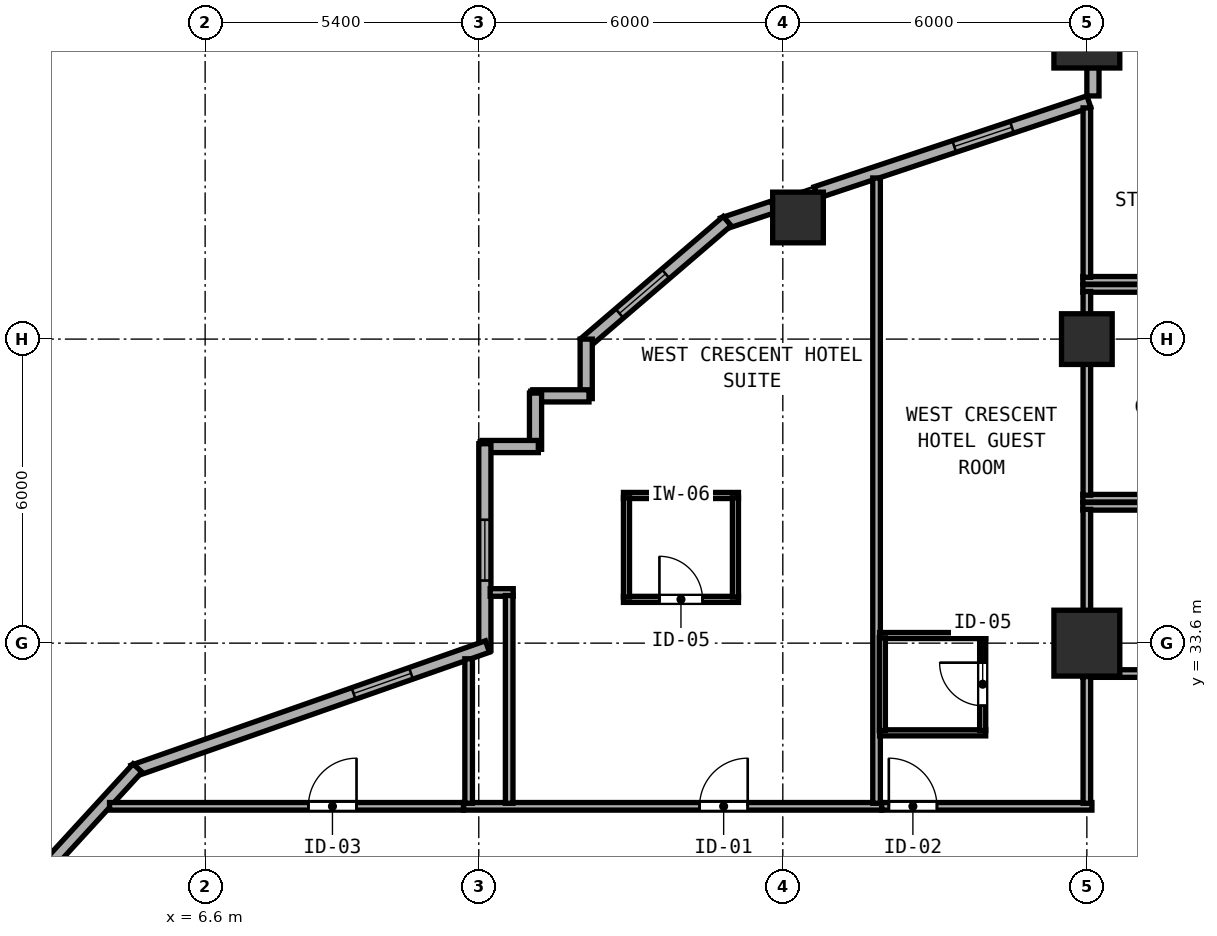
"""IFC4 building model, lengths in metres.
Left out: names, types, materials, properties, quantities, classifications, styles, units other than length and angle.
Written with IfcOpenShell. Run it as: python <this file> out.ifc"""

import sys

from ifc_helpers import new_model, si_unit, direction, frame, frame_2d, origin, origin_2d, place, context, subcontext, project, spatial, rectangle, hollow_rectangle, extrude, element, fill, save


model = new_model("IFC4")
c1 = context("Model", 3, precision=1e-05, world=origin(), true_north=direction((0.0, 1.0)))
c2 = subcontext(c1, "Body", "Model", "MODEL_VIEW")
j1 = project(units=[si_unit("LENGTHUNIT", "METRE"), si_unit("PLANEANGLEUNIT", "RADIAN")], contexts=[c1])
p1 = place(None, origin())
s1 = spatial("IfcSite", under=j1, at=p1, CompositionType="ELEMENT")
p2 = place(p1, origin())
s2 = spatial("IfcBuilding", under=s1, at=p2, CompositionType="ELEMENT")
p3 = place(p2, frame((0.0, 0.0, 31.6)))
s3 = spatial("IfcBuildingStorey", under=s2, at=p3, CompositionType="ELEMENT", Elevation=31.6)
for number, where, z_axis, x_axis in (
    (1, (24.0, 33.6, 0.0), (0.0, 0.0, 1.0), (1.0, 0.0, 0.0)),
    (2, (24.0, 45.6, 0.0), (0.0, 0.0, 1.0), (1.0, 0.0, 0.0)),
):
    element("IfcColumn", number, at=place(p3, frame(where, z_axis=z_axis, x_axis=x_axis)), inside=s3, PredefinedType="COLUMN", context=c2, shape_type="SweptSolid", body=[
        extrude(hollow_rectangle(XDim=1.3, YDim=1.3, WallThickness=0.048, at=origin_2d()), origin(), (0.0, 0.0, 1.0), 3.8),
    ])
for number, where, z_axis, x_axis in (
    (3, (24.0, 39.6, 0.0), (0.0, 0.0, 1.0), (1.0, 0.0, 0.0)),
    (4, (18.3, 42.0, 0.0), (0.0, 0.0, 1.0), (1.0, 0.0, 0.0)),
):
    element("IfcColumn", number, at=place(p3, frame(where, z_axis=z_axis, x_axis=x_axis)), inside=s3, PredefinedType="COLUMN", context=c2, shape_type="SweptSolid", body=[
        extrude(hollow_rectangle(XDim=1.0, YDim=1.0, WallThickness=0.038, at=origin_2d()), origin(), (0.0, 0.0, 1.0), 3.8),
    ])
p4 = place(p3, frame((24.12, 44.958, 0.0), z_axis=(0.0, 0.0, 1.0), x_axis=(0.0, -1.0, 0.0)))
e5 = element("IfcWall", 5, at=p4, inside=s3, PredefinedType="SOLIDWALL", context=c2, shape_type="SweptSolid", body=[
    extrude(rectangle(XDim=0.56, YDim=0.24, at=frame_2d((0.28, 0.0))), origin(), (0.0, 0.0, 1.0), 3.097),
])
p5 = place(p3, frame((24.039, 44.287, 0.0), z_axis=(0.0, 0.0, 1.0), x_axis=(-0.948678995954, -0.316240672014, 0.0)))
e6 = element("IfcWall", 6, at=p5, inside=s3, PredefinedType="SOLIDWALL", context=c2, shape_type="SweptSolid", body=[
    extrude(rectangle(XDim=5.675, YDim=0.24, at=frame_2d((2.837, 0.0))), origin(), (0.0, 0.0, 1.0), 3.097),
])
p6 = place(p5, frame((1.6, 0.0, 0.85)))
e7 = element("IfcOpeningElement", 7, at=p6, cuts=e6, PredefinedType="OPENING", context=c2, shape_type="SweptSolid", body=[
    extrude(rectangle(XDim=1.2, YDim=1.85, at=frame_2d((0.6, 0.925))), frame((0.0, 0.13, 0.0), z_axis=(0.0, -1.0, 0.0), x_axis=(1.0, 0.0, 0.0)), (0.0, 0.0, 1.0), 0.26),
])
p7 = place(p3, frame((17.808, 42.209, 0.0), z_axis=(0.0, 0.0, 1.0), x_axis=(-0.948706457285, -0.316158279832, 0.0)))
e8 = element("IfcWall", 8, at=p7, inside=s3, PredefinedType="SOLIDWALL", context=c2, shape_type="SweptSolid", body=[
    extrude(rectangle(XDim=1.054, YDim=0.24, at=frame_2d((0.527, 0.0))), origin(), (0.0, 0.0, 1.0), 3.6),
])
p8 = place(p3, frame((16.902, 41.929, 0.0), z_axis=(0.0, 0.0, 1.0), x_axis=(-0.759275136126, -0.650769750112, 0.0)))
e9 = element("IfcWall", 9, at=p8, inside=s3, PredefinedType="SOLIDWALL", context=c2, shape_type="SweptSolid", body=[
    extrude(rectangle(XDim=3.719, YDim=0.24, at=frame_2d((1.86, 0.0))), origin(), (0.0, 0.0, 1.0), 3.6),
])
p9 = place(p8, frame((1.6, 0.0, 0.85)))
e10 = element("IfcOpeningElement", 10, at=p9, cuts=e9, PredefinedType="OPENING", context=c2, shape_type="SweptSolid", body=[
    extrude(rectangle(XDim=1.2, YDim=1.85, at=frame_2d((0.6, 0.925))), frame((0.0, 0.13, 0.0), z_axis=(0.0, -1.0, 0.0), x_axis=(1.0, 0.0, 0.0)), (0.0, 0.0, 1.0), 0.26),
])
p10 = place(p3, frame((14.12, 39.6, 0.0), z_axis=(0.0, 0.0, 1.0), x_axis=(0.0, -1.0, 0.0)))
e11 = element("IfcWall", 11, at=p10, inside=s3, PredefinedType="SOLIDWALL", context=c2, shape_type="SweptSolid", body=[
    extrude(rectangle(XDim=1.175, YDim=0.24, at=frame_2d((0.587, 0.0))), origin(), (0.0, 0.0, 1.0), 3.6),
])
p11 = place(p3, frame((14.175, 38.48, 0.0), z_axis=(0.0, 0.0, 1.0), x_axis=(-1.0, 0.0, 0.0)))
e12 = element("IfcWall", 12, at=p11, inside=s3, PredefinedType="SOLIDWALL", context=c2, shape_type="SweptSolid", body=[
    extrude(rectangle(XDim=1.11, YDim=0.24, at=frame_2d((0.555, 0.0))), origin(), (0.0, 0.0, 1.0), 3.6),
])
p12 = place(p3, frame((13.12, 38.535, 0.0), z_axis=(0.0, 0.0, 1.0), x_axis=(0.0, -1.0, 0.0)))
e13 = element("IfcWall", 13, at=p12, inside=s3, PredefinedType="SOLIDWALL", context=c2, shape_type="SweptSolid", body=[
    extrude(rectangle(XDim=1.11, YDim=0.24, at=frame_2d((0.555, 0.0))), origin(), (0.0, 0.0, 1.0), 3.6),
])
p13 = place(p3, frame((13.175, 37.48, 0.0), z_axis=(0.0, 0.0, 1.0), x_axis=(-1.0, 0.0, 0.0)))
e14 = element("IfcWall", 14, at=p13, inside=s3, PredefinedType="SOLIDWALL", context=c2, shape_type="SweptSolid", body=[
    extrude(rectangle(XDim=1.11, YDim=0.24, at=frame_2d((0.555, 0.0))), origin(), (0.0, 0.0, 1.0), 3.6),
])
p14 = place(p3, frame((12.12, 37.535, 0.0), z_axis=(0.0, 0.0, 1.0), x_axis=(0.0, -1.0, 0.0)))
e15 = element("IfcWall", 15, at=p14, inside=s3, PredefinedType="SOLIDWALL", context=c2, shape_type="SweptSolid", body=[
    extrude(rectangle(XDim=4.075, YDim=0.24, at=frame_2d((2.038, 0.0))), origin(), (0.0, 0.0, 1.0), 3.6),
])
p15 = place(p14, frame((1.5, 0.0, 0.85)))
e16 = element("IfcOpeningElement", 16, at=p15, cuts=e15, PredefinedType="OPENING", context=c2, shape_type="SweptSolid", body=[
    extrude(rectangle(XDim=1.2, YDim=1.85, at=frame_2d((0.6, 0.925))), frame((0.0, 0.13, 0.0), z_axis=(0.0, -1.0, 0.0), x_axis=(1.0, 0.0, 0.0)), (0.0, 0.0, 1.0), 0.26),
])
p16 = place(p3, frame((12.172, 33.533, 0.0), z_axis=(0.0, 0.0, 1.0), x_axis=(-0.943600343117, -0.331086684222, 0.0)))
e17 = element("IfcWall", 17, at=p16, inside=s3, PredefinedType="SOLIDWALL", context=c2, shape_type="SweptSolid", body=[
    extrude(rectangle(XDim=7.414, YDim=0.24, at=frame_2d((3.707, 0.0))), origin(), (0.0, 0.0, 1.0), 3.6),
])
p17 = place(p16, frame((1.6, 0.0, 0.85)))
e18 = element("IfcOpeningElement", 18, at=p17, cuts=e17, PredefinedType="OPENING", context=c2, shape_type="SweptSolid", body=[
    extrude(rectangle(XDim=1.2, YDim=1.85, at=frame_2d((0.6, 0.925))), frame((0.0, 0.13, 0.0), z_axis=(0.0, -1.0, 0.0), x_axis=(1.0, 0.0, 0.0)), (0.0, 0.0, 1.0), 0.26),
])
p18 = place(p3, frame((5.265, 31.137, 0.0), z_axis=(0.0, 0.0, 1.0), x_axis=(-0.675785130265, -0.737098675696, 0.0)))
e19 = element("IfcWall", 19, at=p18, inside=s3, PredefinedType="SOLIDWALL", context=c2, shape_type="SweptSolid", body=[
    extrude(rectangle(XDim=3.289, YDim=0.24, at=frame_2d((1.645, 0.0))), origin(), (0.0, 0.0, 1.0), 3.6),
])
for number, where, z_axis, x_axis in (
    (20, (23.92, 36.3, 0.0), (0.0, 0.0, 1.0), (1.0, 0.0, 0.0)),
    (21, (23.92, 33.0, 0.0), (0.0, 0.0, 1.0), (1.0, 0.0, 0.0)),
):
    element("IfcWall", number, at=place(p3, frame(where, z_axis=z_axis, x_axis=x_axis)), inside=s3, PredefinedType="PARTITIONING", context=c2, shape_type="SweptSolid", body=[
        extrude(rectangle(XDim=3.8, YDim=0.15, at=frame_2d((1.9, 0.0))), origin(), (0.0, 0.0, 1.0), 3.6),
    ])
p19 = place(p3, frame((24.0, 33.06, 0.0), z_axis=(0.0, 0.0, 1.0), x_axis=(0.0, 1.0, 0.0)))
e22 = element("IfcWall", 22, at=p19, inside=s3, PredefinedType="PARTITIONING", context=c2, shape_type="SweptSolid", body=[
    extrude(rectangle(XDim=3.18, YDim=0.15, at=frame_2d((1.59, 0.0))), origin(), (0.0, 0.0, 1.0), 3.097),
])
for number, where, z_axis, x_axis in (
    (23, (23.92, 40.6, 0.0), (0.0, 0.0, 1.0), (1.0, 0.0, 0.0)),
    (24, (23.92, 36.46, 0.0), (0.0, 0.0, 1.0), (1.0, 0.0, 0.0)),
):
    element("IfcWall", number, at=place(p3, frame(where, z_axis=z_axis, x_axis=x_axis)), inside=s3, PredefinedType="PARTITIONING", context=c2, shape_type="SweptSolid", body=[
        extrude(rectangle(XDim=3.8, YDim=0.15, at=frame_2d((1.9, 0.0))), origin(), (0.0, 0.0, 1.0), 3.6),
    ])
p20 = place(p3, frame((24.0, 36.52, 0.0), z_axis=(0.0, 0.0, 1.0), x_axis=(0.0, 1.0, 0.0)))
e25 = element("IfcWall", 25, at=p20, inside=s3, PredefinedType="PARTITIONING", context=c2, shape_type="SweptSolid", body=[
    extrude(rectangle(XDim=4.02, YDim=0.15, at=frame_2d((2.01, 0.0))), origin(), (0.0, 0.0, 1.0), 3.097),
])
p21 = place(p3, frame((23.92, 40.76, 0.0), z_axis=(0.0, 0.0, 1.0), x_axis=(1.0, 0.0, 0.0)))
e26 = element("IfcWall", 26, at=p21, inside=s3, PredefinedType="PARTITIONING", context=c2, shape_type="SweptSolid", body=[
    extrude(rectangle(XDim=3.8, YDim=0.15, at=frame_2d((1.9, 0.0))), origin(), (0.0, 0.0, 1.0), 3.6),
])
p22 = place(p3, frame((24.0, 40.82, 0.0), z_axis=(0.0, 0.0, 1.0), x_axis=(0.0, 1.0, 0.0)))
e27 = element("IfcWall", 27, at=p22, inside=s3, PredefinedType="PARTITIONING", context=c2, shape_type="SweptSolid", body=[
    extrude(rectangle(XDim=3.343, YDim=0.15, at=frame_2d((1.671, 0.0))), origin(), (0.0, 0.0, 1.0), 3.097),
])
p23 = place(p3, frame((11.7, 30.38, 0.0), z_axis=(0.0, 0.0, 1.0), x_axis=(1.0, 0.0, 0.0)))
e28 = element("IfcWall", 28, at=p23, inside=s3, PredefinedType="PARTITIONING", context=c2, shape_type="SweptSolid", body=[
    extrude(rectangle(XDim=8.25, YDim=0.15, at=frame_2d((4.125, 0.0))), origin(), (0.0, 0.0, 1.0), 3.6),
])
p24 = place(p23, frame((4.657, 0.0, 0.0)))
e29 = element("IfcOpeningElement", 29, at=p24, cuts=e28, PredefinedType="OPENING", context=c2, shape_type="SweptSolid", body=[
    extrude(rectangle(XDim=0.95, YDim=2.18, at=frame_2d((0.475, 1.09))), frame((0.0, 0.085, 0.0), z_axis=(0.0, -1.0, 0.0), x_axis=(1.0, 0.0, 0.0)), (0.0, 0.0, 1.0), 0.17),
])
p25 = place(p3, frame((11.8, 30.44, 0.0), z_axis=(0.0, 0.0, 1.0), x_axis=(0.0, 1.0, 0.0)))
e30 = element("IfcWall", 30, at=p25, inside=s3, PredefinedType="PARTITIONING", context=c2, shape_type="SweptSolid", body=[
    extrude(rectangle(XDim=2.851, YDim=0.15, at=frame_2d((1.426, 0.0))), origin(), (0.0, 0.0, 1.0), 3.6),
])
p26 = place(p3, frame((19.85, 30.44, 0.0), z_axis=(0.0, 0.0, 1.0), x_axis=(0.0, 1.0, 0.0)))
e31 = element("IfcWall", 31, at=p26, inside=s3, PredefinedType="PARTITIONING", context=c2, shape_type="SweptSolid", body=[
    extrude(rectangle(XDim=12.34, YDim=0.15, at=frame_2d((6.17, 0.0))), origin(), (0.0, 0.0, 1.0), 3.6),
])
p27 = place(p3, frame((14.855, 36.514, 0.0), z_axis=(0.0, 0.0, 1.0), x_axis=(1.0, 0.0, 0.0)))
e32 = element("IfcWall", 32, at=p27, inside=s3, PredefinedType="PARTITIONING", context=c2, shape_type="SweptSolid", body=[
    extrude(rectangle(XDim=2.27, YDim=0.12, at=frame_2d((1.135, 0.0))), origin(), (0.0, 0.0, 1.0), 3.6),
])
p28 = place(p3, frame((14.855, 34.464, 0.0), z_axis=(0.0, 0.0, 1.0), x_axis=(1.0, 0.0, 0.0)))
e33 = element("IfcWall", 33, at=p28, inside=s3, PredefinedType="PARTITIONING", context=c2, shape_type="SweptSolid", body=[
    extrude(rectangle(XDim=2.27, YDim=0.12, at=frame_2d((1.135, 0.0))), origin(), (0.0, 0.0, 1.0), 3.6),
])
p29 = place(p28, frame((0.71, 0.0, 0.0)))
e34 = element("IfcOpeningElement", 34, at=p29, cuts=e33, PredefinedType="OPENING", context=c2, shape_type="SweptSolid", body=[
    extrude(rectangle(XDim=0.85, YDim=2.1, at=frame_2d((0.425, 1.05))), frame((0.0, 0.07, 0.0), z_axis=(0.0, -1.0, 0.0), x_axis=(1.0, 0.0, 0.0)), (0.0, 0.0, 1.0), 0.14),
])
for number, where, z_axis, x_axis in (
    (35, (14.915, 34.509, 0.0), (0.0, 0.0, 1.0), (0.0, 1.0, 0.0)),
    (36, (17.065, 34.509, 0.0), (0.0, 0.0, 1.0), (0.0, 1.0, 0.0)),
):
    element("IfcWall", number, at=place(p3, frame(where, z_axis=z_axis, x_axis=x_axis)), inside=s3, PredefinedType="PARTITIONING", context=c2, shape_type="SweptSolid", body=[
        extrude(rectangle(XDim=1.96, YDim=0.12, at=frame_2d((0.98, 0.0))), origin(), (0.0, 0.0, 1.0), 3.6),
    ])
p30 = place(p3, frame((19.952, 30.38, 0.0), z_axis=(0.0, 0.0, 1.0), x_axis=(1.0, 0.0, 0.0)))
e37 = element("IfcWall", 37, at=p30, inside=s3, PredefinedType="PARTITIONING", context=c2, shape_type="SweptSolid", body=[
    extrude(rectangle(XDim=4.148, YDim=0.15, at=frame_2d((2.074, 0.0))), origin(), (0.0, 0.0, 1.0), 3.6),
])
p31 = place(p30, frame((0.14, 0.0, 0.0)))
e38 = element("IfcOpeningElement", 38, at=p31, cuts=e37, PredefinedType="OPENING", context=c2, shape_type="SweptSolid", body=[
    extrude(rectangle(XDim=0.95, YDim=2.15, at=frame_2d((0.475, 1.075))), frame((0.0, 0.085, 0.0), z_axis=(0.0, -1.0, 0.0), x_axis=(1.0, 0.0, 0.0)), (0.0, 0.0, 1.0), 0.17),
])
p32 = place(p3, frame((24.0, 30.44, 0.0), z_axis=(0.0, 0.0, 1.0), x_axis=(0.0, 1.0, 0.0)))
e39 = element("IfcWall", 39, at=p32, inside=s3, PredefinedType="PARTITIONING", context=c2, shape_type="SweptSolid", body=[
    extrude(rectangle(XDim=2.5, YDim=0.15, at=frame_2d((1.25, 0.0))), origin(), (0.0, 0.0, 1.0), 3.097),
])
for number, where, z_axis, x_axis in (
    (40, (19.91, 33.75, 0.0), (0.0, 0.0, 1.0), (1.0, 0.0, 0.0)),
    (41, (19.91, 31.83, 0.0), (0.0, 0.0, 1.0), (1.0, 0.0, 0.0)),
):
    element("IfcWall", number, at=place(p3, frame(where, z_axis=z_axis, x_axis=x_axis)), inside=s3, PredefinedType="PARTITIONING", context=c2, shape_type="SweptSolid", body=[
        extrude(rectangle(XDim=2.094, YDim=0.12, at=frame_2d((1.047, 0.0))), origin(), (0.0, 0.0, 1.0), 3.6),
    ])
p33 = place(p3, frame((19.964, 31.875, 0.0), z_axis=(0.0, 0.0, 1.0), x_axis=(0.0, 1.0, 0.0)))
e42 = element("IfcWall", 42, at=p33, inside=s3, PredefinedType="PARTITIONING", context=c2, shape_type="SweptSolid", body=[
    extrude(rectangle(XDim=1.83, YDim=0.12, at=frame_2d((0.915, 0.0))), origin(), (0.0, 0.0, 1.0), 3.6),
])
p34 = place(p3, frame((21.944, 31.875, 0.0), z_axis=(0.0, 0.0, 1.0), x_axis=(0.0, 1.0, 0.0)))
e43 = element("IfcWall", 43, at=p34, inside=s3, PredefinedType="PARTITIONING", context=c2, shape_type="SweptSolid", body=[
    extrude(rectangle(XDim=1.83, YDim=0.12, at=frame_2d((0.915, 0.0))), origin(), (0.0, 0.0, 1.0), 3.6),
])
p35 = place(p34, frame((0.49, 0.0, 0.0)))
e44 = element("IfcOpeningElement", 44, at=p35, cuts=e43, PredefinedType="OPENING", context=c2, shape_type="SweptSolid", body=[
    extrude(rectangle(XDim=0.85, YDim=2.1, at=frame_2d((0.425, 1.05))), frame((0.0, 0.07, 0.0), z_axis=(0.0, -1.0, 0.0), x_axis=(1.0, 0.0, 0.0)), (0.0, 0.0, 1.0), 0.14),
])
p36 = place(p3, frame((12.225, 34.6, 0.0), z_axis=(0.0, 0.0, 1.0), x_axis=(1.0, 0.0, 0.0)))
e45 = element("IfcWall", 45, at=p36, inside=s3, PredefinedType="PARTITIONING", context=c2, shape_type="SweptSolid", body=[
    extrude(rectangle(XDim=0.455, YDim=0.15, at=frame_2d((0.228, 0.0))), origin(), (0.0, 0.0, 1.0), 3.6),
])
p37 = place(p3, frame((4.714, 30.38, 0.0), z_axis=(0.0, 0.0, 1.0), x_axis=(1.0, 0.0, 0.0)))
e46 = element("IfcWall", 46, at=p37, inside=s3, PredefinedType="PARTITIONING", context=c2, shape_type="SweptSolid", body=[
    extrude(rectangle(XDim=6.984, YDim=0.15, at=frame_2d((3.492, 0.0))), origin(), (0.0, 0.0, 1.0), 3.6),
])
p38 = place(p37, frame((3.924, 0.0, 0.0)))
e47 = element("IfcOpeningElement", 47, at=p38, cuts=e46, PredefinedType="OPENING", context=c2, shape_type="SweptSolid", body=[
    extrude(rectangle(XDim=0.95, YDim=2.12, at=frame_2d((0.475, 1.06))), frame((0.0, 0.085, 0.0), z_axis=(0.0, -1.0, 0.0), x_axis=(1.0, 0.0, 0.0)), (0.0, 0.0, 1.0), 0.17),
])
p39 = place(p3, frame((12.6, 30.44, 0.0), z_axis=(0.0, 0.0, 1.0), x_axis=(0.0, 1.0, 0.0)))
e48 = element("IfcWall", 48, at=p39, inside=s3, PredefinedType="PARTITIONING", context=c2, shape_type="SweptSolid", body=[
    extrude(rectangle(XDim=4.1, YDim=0.15, at=frame_2d((2.05, 0.0))), origin(), (0.0, 0.0, 1.0), 3.6),
])
p40 = place(p6, origin())
e49 = element("IfcWindow", 49, at=p40, inside=s3, PartitioningType="SINGLE_PANEL", PredefinedType="WINDOW", context=c2, shape_type="SweptSolid", body=[
    extrude(rectangle(XDim=1.2, YDim=1.85, at=frame_2d((0.6, 0.925))), frame((0.0, 0.03, 0.0), z_axis=(0.0, -1.0, 0.0), x_axis=(1.0, 0.0, 0.0)), (0.0, 0.0, 1.0), 0.06),
])
fill(e7, e49)
p41 = place(p9, origin())
e50 = element("IfcWindow", 50, at=p41, inside=s3, PartitioningType="SINGLE_PANEL", PredefinedType="WINDOW", context=c2, shape_type="SweptSolid", body=[
    extrude(rectangle(XDim=1.2, YDim=1.85, at=frame_2d((0.6, 0.925))), frame((0.0, 0.03, 0.0), z_axis=(0.0, -1.0, 0.0), x_axis=(1.0, 0.0, 0.0)), (0.0, 0.0, 1.0), 0.06),
])
fill(e10, e50)
p42 = place(p15, origin())
e51 = element("IfcWindow", 51, at=p42, inside=s3, PartitioningType="SINGLE_PANEL", PredefinedType="WINDOW", context=c2, shape_type="SweptSolid", body=[
    extrude(rectangle(XDim=1.2, YDim=1.85, at=frame_2d((0.6, 0.925))), frame((0.0, 0.03, 0.0), z_axis=(0.0, -1.0, 0.0), x_axis=(1.0, 0.0, 0.0)), (0.0, 0.0, 1.0), 0.06),
])
fill(e16, e51)
p43 = place(p17, origin())
e52 = element("IfcWindow", 52, at=p43, inside=s3, PartitioningType="SINGLE_PANEL", PredefinedType="WINDOW", context=c2, shape_type="SweptSolid", body=[
    extrude(rectangle(XDim=1.2, YDim=1.85, at=frame_2d((0.6, 0.925))), frame((0.0, 0.03, 0.0), z_axis=(0.0, -1.0, 0.0), x_axis=(1.0, 0.0, 0.0)), (0.0, 0.0, 1.0), 0.06),
])
fill(e18, e52)
p44 = place(p24, origin())
e53 = element("IfcDoor", 53, at=p44, inside=s3, OperationType="SINGLE_SWING_RIGHT", PredefinedType="DOOR", context=c2, shape_type="SweptSolid", body=[
    extrude(rectangle(XDim=0.95, YDim=2.18, at=frame_2d((0.475, 1.09))), frame((0.0, 0.025, 0.0), z_axis=(0.0, -1.0, 0.0), x_axis=(1.0, 0.0, 0.0)), (0.0, 0.0, 1.0), 0.05),
])
fill(e29, e53)
p45 = place(p29, origin())
e54 = element("IfcDoor", 54, at=p45, inside=s3, OperationType="SINGLE_SWING_LEFT", PredefinedType="DOOR", context=c2, shape_type="SweptSolid", body=[
    extrude(rectangle(XDim=0.85, YDim=2.1, at=frame_2d((0.425, 1.05))), frame((0.0, 0.025, 0.0), z_axis=(0.0, -1.0, 0.0), x_axis=(1.0, 0.0, 0.0)), (0.0, 0.0, 1.0), 0.05),
])
fill(e34, e54)
p46 = place(p31, origin())
e55 = element("IfcDoor", 55, at=p46, inside=s3, OperationType="SINGLE_SWING_LEFT", PredefinedType="DOOR", context=c2, shape_type="SweptSolid", body=[
    extrude(rectangle(XDim=0.95, YDim=2.15, at=frame_2d((0.475, 1.075))), frame((0.0, 0.025, 0.0), z_axis=(0.0, -1.0, 0.0), x_axis=(1.0, 0.0, 0.0)), (0.0, 0.0, 1.0), 0.05),
])
fill(e38, e55)
p47 = place(p35, origin())
e56 = element("IfcDoor", 56, at=p47, inside=s3, OperationType="SINGLE_SWING_RIGHT", PredefinedType="DOOR", context=c2, shape_type="SweptSolid", body=[
    extrude(rectangle(XDim=0.85, YDim=2.1, at=frame_2d((0.425, 1.05))), frame((0.0, 0.025, 0.0), z_axis=(0.0, -1.0, 0.0), x_axis=(1.0, 0.0, 0.0)), (0.0, 0.0, 1.0), 0.05),
])
fill(e44, e56)
p48 = place(p38, origin())
e57 = element("IfcDoor", 57, at=p48, inside=s3, OperationType="SINGLE_SWING_RIGHT", PredefinedType="DOOR", context=c2, shape_type="SweptSolid", body=[
    extrude(rectangle(XDim=0.95, YDim=2.12, at=frame_2d((0.475, 1.06))), frame((0.0, 0.025, 0.0), z_axis=(0.0, -1.0, 0.0), x_axis=(1.0, 0.0, 0.0)), (0.0, 0.0, 1.0), 0.05),
])
fill(e47, e57)
save(model, sys.argv[1])
